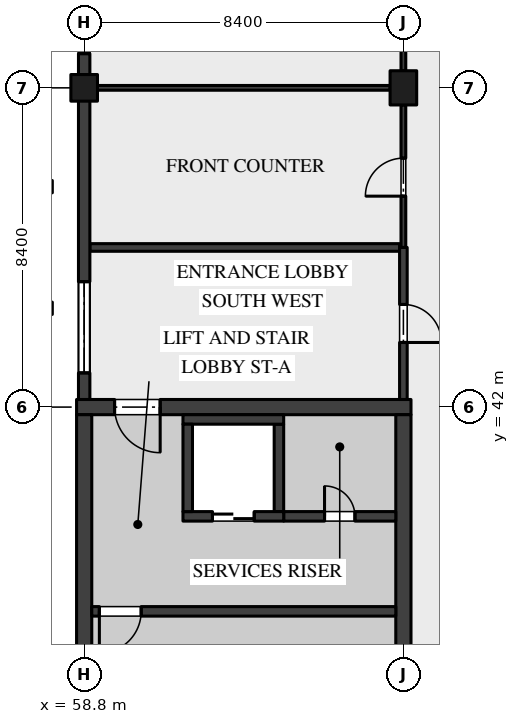
"""IFC4 building model, lengths in metres.
Left out: names, types, materials, properties, quantities, classifications, styles, units other than length and angle.
Written with IfcOpenShell. Run it as: python <this file> out.ifc"""

import sys

from ifc_helpers import new_model, si_unit, direction, frame, frame_2d, origin, origin_2d, place, context, subcontext, project, spatial, rectangle, hollow_circle, extrude, element, fill, save


model = new_model("IFC4")
c1 = context("Model", 3, precision=1e-05, world=origin(), true_north=direction((0.0, 1.0)))
c2 = subcontext(c1, "Body", "Model", "MODEL_VIEW")
j1 = project(units=[si_unit("LENGTHUNIT", "METRE"), si_unit("PLANEANGLEUNIT", "RADIAN")], contexts=[c1])
p1 = place(None, origin())
s1 = spatial("IfcSite", under=j1, at=p1, CompositionType="ELEMENT")
p2 = place(p1, origin())
s2 = spatial("IfcBuilding", under=s1, at=p2, CompositionType="ELEMENT")
p3 = place(p2, origin())
s3 = spatial("IfcBuildingStorey", under=s2, at=p3, CompositionType="ELEMENT", Elevation=0.0)
p4 = place(p3, frame((58.8, 50.4, 0.0), z_axis=(0.0, 0.0, 1.0), x_axis=(1.0, 0.0, 0.0)))
e1 = element("IfcColumn", 1, at=p4, inside=s3, PredefinedType="COLUMN", context=c2, shape_type="SweptSolid", body=[
    extrude(rectangle(XDim=0.7, YDim=0.7, at=origin_2d()), origin(), (0.0, 0.0, 1.0), 5.05),
])
p5 = place(p3, frame((67.2, 50.4, 0.0), z_axis=(0.0, 0.0, 1.0), x_axis=(1.0, 0.0, 0.0)))
e2 = element("IfcColumn", 2, at=p5, inside=s3, PredefinedType="COLUMN", context=c2, shape_type="SweptSolid", body=[
    extrude(rectangle(XDim=0.7, YDim=0.9, at=origin_2d()), origin(), (0.0, 0.0, 1.0), 5.05),
])
for number, where, z_axis, x_axis in (
    (3, (57.8, 44.6, 0.0), (0.0, 0.0, 1.0), (1.0, 0.0, 0.0)),
    (4, (57.8, 47.8, 0.0), (0.0, 0.0, 1.0), (1.0, 0.0, 0.0)),
):
    element("IfcColumn", number, at=place(p3, frame(where, z_axis=z_axis, x_axis=x_axis)), inside=s3, PredefinedType="COLUMN", context=c2, shape_type="SweptSolid", body=[
        extrude(hollow_circle(Radius=0.162, WallThickness=0.013, at=origin_2d()), origin(), (0.0, 0.0, 1.0), 4.162),
    ])
p6 = place(p3, frame((58.6, 42.0, 0.0), z_axis=(0.0, 0.0, 1.0), x_axis=(1.0, 0.0, 0.0)))
e5 = element("IfcWall", 5, at=p6, inside=s3, PredefinedType="SHEAR", context=c2, shape_type="SweptSolid", body=[
    extrude(rectangle(XDim=8.8, YDim=0.4, at=frame_2d((4.4, 0.0))), origin(), (0.0, 0.0, 1.0), 5.05),
])
p7 = place(p6, frame((1.0, 0.0, 0.0)))
e6 = element("IfcOpeningElement", 6, at=p7, cuts=e5, PredefinedType="OPENING", context=c2, shape_type="SweptSolid", body=[
    extrude(rectangle(XDim=1.2, YDim=2.1, at=frame_2d((0.6, 1.05))), frame((0.0, 0.21, 0.0), z_axis=(0.0, -1.0, 0.0), x_axis=(1.0, 0.0, 0.0)), (0.0, 0.0, 1.0), 0.42),
])
for number, where, z_axis, x_axis in (
    (7, (58.8, 33.8, 0.0), (0.0, 0.0, 1.0), (0.0, 1.0, 0.0)),
    (8, (67.2, 33.8, 0.0), (0.0, 0.0, 1.0), (0.0, 1.0, 0.0)),
):
    element("IfcWall", number, at=place(p3, frame(where, z_axis=z_axis, x_axis=x_axis)), inside=s3, PredefinedType="SHEAR", context=c2, shape_type="SweptSolid", body=[
        extrude(rectangle(XDim=8.0, YDim=0.4, at=frame_2d((4.0, 0.0))), origin(), (0.0, 0.0, 1.0), 5.05),
    ])
p8 = place(p3, frame((59.0, 36.625, 0.0), z_axis=(0.0, 0.0, 1.0), x_axis=(1.0, 0.0, 0.0)))
e9 = element("IfcWall", 9, at=p8, inside=s3, PredefinedType="SOLIDWALL", context=c2, shape_type="SweptSolid", body=[
    extrude(rectangle(XDim=8.0, YDim=0.25, at=frame_2d((4.0, 0.0))), origin(), (0.0, 0.0, 1.0), 5.05),
])
p9 = place(p8, frame((0.2, 0.0, 0.0)))
e10 = element("IfcOpeningElement", 10, at=p9, cuts=e9, PredefinedType="OPENING", context=c2, shape_type="SweptSolid", body=[
    extrude(rectangle(XDim=1.1, YDim=2.1, at=frame_2d((0.55, 1.05))), frame((0.0, 0.135, 0.0), z_axis=(0.0, -1.0, 0.0), x_axis=(1.0, 0.0, 0.0)), (0.0, 0.0, 1.0), 0.27),
])
p10 = place(p3, frame((64.05, 39.125, 0.0), z_axis=(0.0, 0.0, 1.0), x_axis=(1.0, 0.0, 0.0)))
e11 = element("IfcWall", 11, at=p10, inside=s3, PredefinedType="SOLIDWALL", context=c2, shape_type="SweptSolid", body=[
    extrude(rectangle(XDim=2.95, YDim=0.25, at=frame_2d((1.475, 0.0))), origin(), (0.0, 0.0, 1.0), 5.05),
])
p11 = place(p10, frame((1.075, 0.0, 0.0)))
e12 = element("IfcOpeningElement", 12, at=p11, cuts=e11, PredefinedType="OPENING", context=c2, shape_type="SweptSolid", body=[
    extrude(rectangle(XDim=0.8, YDim=2.1, at=frame_2d((0.4, 1.05))), frame((0.0, 0.135, 0.0), z_axis=(0.0, -1.0, 0.0), x_axis=(1.0, 0.0, 0.0)), (0.0, 0.0, 1.0), 0.27),
])
p12 = place(p3, frame((63.925, 39.25, 0.0), z_axis=(0.0, 0.0, 1.0), x_axis=(0.0, 1.0, 0.0)))
e13 = element("IfcWall", 13, at=p12, inside=s3, PredefinedType="SOLIDWALL", context=c2, shape_type="SweptSolid", body=[
    extrude(rectangle(XDim=2.3, YDim=0.25, at=frame_2d((1.15, 0.0))), origin(), (0.0, 0.0, 1.0), 5.05),
])
p13 = place(p3, frame((61.4, 41.675, 0.0), z_axis=(0.0, 0.0, 1.0), x_axis=(1.0, 0.0, 0.0)))
e14 = element("IfcWall", 14, at=p13, inside=s3, PredefinedType="SOLIDWALL", context=c2, shape_type="SweptSolid", body=[
    extrude(rectangle(XDim=2.65, YDim=0.25, at=frame_2d((1.325, 0.0))), origin(), (0.0, 0.0, 1.0), 5.05),
])
p14 = place(p3, frame((61.4, 39.125, 0.0), z_axis=(0.0, 0.0, 1.0), x_axis=(1.0, 0.0, 0.0)))
e15 = element("IfcWall", 15, at=p14, inside=s3, PredefinedType="SOLIDWALL", context=c2, shape_type="SweptSolid", body=[
    extrude(rectangle(XDim=2.65, YDim=0.25, at=frame_2d((1.325, 0.0))), origin(), (0.0, 0.0, 1.0), 5.05),
])
p15 = place(p14, frame((0.775, 0.0, 0.0)))
e16 = element("IfcOpeningElement", 16, at=p15, cuts=e15, PredefinedType="OPENING", context=c2, shape_type="SweptSolid", body=[
    extrude(rectangle(XDim=1.1, YDim=2.1, at=frame_2d((0.55, 1.05))), frame((0.0, 0.135, 0.0), z_axis=(0.0, -1.0, 0.0), x_axis=(1.0, 0.0, 0.0)), (0.0, 0.0, 1.0), 0.27),
])
p16 = place(p3, frame((61.525, 39.25, 0.0), z_axis=(0.0, 0.0, 1.0), x_axis=(0.0, 1.0, 0.0)))
e17 = element("IfcWall", 17, at=p16, inside=s3, PredefinedType="SOLIDWALL", context=c2, shape_type="SweptSolid", body=[
    extrude(rectangle(XDim=2.3, YDim=0.25, at=frame_2d((1.15, 0.0))), origin(), (0.0, 0.0, 1.0), 5.05),
])
p17 = place(p3, frame((67.2, 46.2, 0.0), z_axis=(0.0, 0.0, 1.0), x_axis=(0.0, 1.0, 0.0)))
e18 = element("IfcWall", 18, at=p17, inside=s3, PredefinedType="PARTITIONING", context=c2, shape_type="SweptSolid", body=[
    extrude(rectangle(XDim=3.75, YDim=0.125, at=frame_2d((1.875, 0.0))), origin(), (0.0, 0.0, 1.0), 18.77),
])
p18 = place(p17, frame((1.35, 0.0, 0.0)))
e19 = element("IfcOpeningElement", 19, at=p18, cuts=e18, PredefinedType="OPENING", context=c2, shape_type="SweptSolid", body=[
    extrude(rectangle(XDim=1.0, YDim=2.4, at=frame_2d((0.5, 1.2))), frame((0.0, 0.073, 0.0), z_axis=(0.0, -1.0, 0.0), x_axis=(1.0, 0.0, 0.0)), (0.0, 0.0, 1.0), 0.145),
])
p19 = place(p3, frame((59.15, 50.4, 0.0), z_axis=(0.0, 0.0, 1.0), x_axis=(1.0, 0.0, 0.0)))
e20 = element("IfcWall", 20, at=p19, inside=s3, PredefinedType="PARTITIONING", context=c2, shape_type="SweptSolid", body=[
    extrude(rectangle(XDim=7.7, YDim=0.125, at=frame_2d((3.85, 0.0))), origin(), (0.0, 0.0, 1.0), 5.05),
])
p20 = place(p3, frame((58.95, 46.2, 0.0), z_axis=(0.0, 0.0, 1.0), x_axis=(1.0, 0.0, 0.0)))
e21 = element("IfcWall", 21, at=p20, inside=s3, PredefinedType="PARTITIONING", context=c2, shape_type="SweptSolid", body=[
    extrude(rectangle(XDim=8.15, YDim=0.2, at=frame_2d((4.075, 0.0))), origin(), (0.0, 0.0, 1.0), 5.05),
])
p21 = place(p3, frame((67.2, 50.85, 0.0), z_axis=(0.0, 0.0, 1.0), x_axis=(0.0, 1.0, 0.0)))
e22 = element("IfcWall", 22, at=p21, inside=s3, PredefinedType="PARTITIONING", context=c2, shape_type="SweptSolid", body=[
    extrude(rectangle(XDim=3.75, YDim=0.125, at=frame_2d((1.875, 0.0))), origin(), (0.0, 0.0, 1.0), 18.77),
])
p22 = place(p21, frame((1.35, 0.0, 0.0)))
e23 = element("IfcOpeningElement", 23, at=p22, cuts=e22, PredefinedType="OPENING", context=c2, shape_type="SweptSolid", body=[
    extrude(rectangle(XDim=1.0, YDim=2.4, at=frame_2d((0.5, 1.2))), frame((0.0, 0.073, 0.0), z_axis=(0.0, -1.0, 0.0), x_axis=(1.0, 0.0, 0.0)), (0.0, 0.0, 1.0), 0.145),
])
p23 = place(p3, frame((67.2, 42.2, 0.0), z_axis=(0.0, 0.0, 1.0), x_axis=(0.0, 1.0, 0.0)))
e24 = element("IfcWall", 24, at=p23, inside=s3, PredefinedType="PARTITIONING", context=c2, shape_type="SweptSolid", body=[
    extrude(rectangle(XDim=4.0, YDim=0.2, at=frame_2d((2.0, 0.0))), origin(), (0.0, 0.0, 1.0), 18.77),
])
p24 = place(p23, frame((1.5, 0.0, 0.0)))
e25 = element("IfcOpeningElement", 25, at=p24, cuts=e24, PredefinedType="OPENING", context=c2, shape_type="SweptSolid", body=[
    extrude(rectangle(XDim=1.0, YDim=2.4, at=frame_2d((0.5, 1.2))), frame((0.0, 0.11, 0.0), z_axis=(0.0, -1.0, 0.0), x_axis=(1.0, 0.0, 0.0)), (0.0, 0.0, 1.0), 0.22),
])
p25 = place(p3, frame((58.8, 58.6, 0.0), z_axis=(0.0, 0.0, 1.0), x_axis=(0.0, -1.0, 0.0)))
e26 = element("IfcWall", 26, at=p25, inside=s3, PredefinedType="SOLIDWALL", context=c2, shape_type="SweptSolid", body=[
    extrude(rectangle(XDim=7.87, YDim=0.3, at=frame_2d((3.935, 0.0))), origin(), (0.0, 0.0, 1.0), 5.05),
])
p26 = place(p25, frame((0.4, 0.0, 2.85)))
e27 = element("IfcOpeningElement", 27, at=p26, cuts=e26, PredefinedType="OPENING", context=c2, shape_type="SweptSolid", body=[
    extrude(rectangle(XDim=3.0, YDim=1.2, at=frame_2d((1.5, 0.6))), frame((0.0, 0.16, 0.0), z_axis=(0.0, -1.0, 0.0), x_axis=(1.0, 0.0, 0.0)), (0.0, 0.0, 1.0), 0.32),
])
p27 = place(p25, frame((4.9, 0.0, 2.25)))
e28 = element("IfcOpeningElement", 28, at=p27, cuts=e26, PredefinedType="OPENING", context=c2, shape_type="SweptSolid", body=[
    extrude(rectangle(XDim=2.4, YDim=1.8, at=frame_2d((1.2, 0.9))), frame((0.0, 0.16, 0.0), z_axis=(0.0, -1.0, 0.0), x_axis=(1.0, 0.0, 0.0)), (0.0, 0.0, 1.0), 0.32),
])
p28 = place(p3, frame((58.8, 50.07, 0.0), z_axis=(0.0, 0.0, 1.0), x_axis=(0.0, -1.0, 0.0)))
e29 = element("IfcWall", 29, at=p28, inside=s3, PredefinedType="SOLIDWALL", context=c2, shape_type="SweptSolid", body=[
    extrude(rectangle(XDim=7.87, YDim=0.3, at=frame_2d((3.935, 0.0))), origin(), (0.0, 0.0, 1.0), 5.05),
])
p29 = place(p28, frame((4.77, 0.0, 2.25)))
e30 = element("IfcOpeningElement", 30, at=p29, cuts=e29, PredefinedType="OPENING", context=c2, shape_type="SweptSolid", body=[
    extrude(rectangle(XDim=2.4, YDim=1.8, at=frame_2d((1.2, 0.9))), frame((0.0, 0.16, 0.0), z_axis=(0.0, -1.0, 0.0), x_axis=(1.0, 0.0, 0.0)), (0.0, 0.0, 1.0), 0.32),
])
p30 = place(p7, frame((1.2, 0.0, 0.0), z_axis=(0.0, 0.0, 1.0), x_axis=(-1.0, 0.0, 0.0)))
e31 = element("IfcDoor", 31, at=p30, inside=s3, OperationType="SINGLE_SWING_RIGHT", PredefinedType="DOOR", context=c2, shape_type="SweptSolid", body=[
    extrude(rectangle(XDim=1.2, YDim=2.1, at=frame_2d((0.6, 1.05))), frame((0.0, 0.035, 0.0), z_axis=(0.0, -1.0, 0.0), x_axis=(1.0, 0.0, 0.0)), (0.0, 0.0, 1.0), 0.07),
])
fill(e6, e31)
p31 = place(p11, origin())
e32 = element("IfcDoor", 32, at=p31, inside=s3, OperationType="SINGLE_SWING_RIGHT", PredefinedType="DOOR", context=c2, shape_type="SweptSolid", body=[
    extrude(rectangle(XDim=0.8, YDim=2.1, at=frame_2d((0.4, 1.05))), frame((0.0, 0.035, 0.0), z_axis=(0.0, -1.0, 0.0), x_axis=(1.0, 0.0, 0.0)), (0.0, 0.0, 1.0), 0.07),
])
fill(e12, e32)
p32 = place(p9, frame((1.1, 0.0, 0.0), z_axis=(0.0, 0.0, 1.0), x_axis=(-1.0, 0.0, 0.0)))
e33 = element("IfcDoor", 33, at=p32, inside=s3, OperationType="SINGLE_SWING_LEFT", PredefinedType="DOOR", context=c2, shape_type="SweptSolid", body=[
    extrude(rectangle(XDim=1.1, YDim=2.1, at=frame_2d((0.55, 1.05))), frame((0.0, 0.035, 0.0), z_axis=(0.0, -1.0, 0.0), x_axis=(1.0, 0.0, 0.0)), (0.0, 0.0, 1.0), 0.07),
])
fill(e10, e33)
p33 = place(p15, origin())
e34 = element("IfcDoor", 34, at=p33, inside=s3, OperationType="DOUBLE_DOOR_SLIDING", PredefinedType="DOOR", context=c2, shape_type="SweptSolid", body=[
    extrude(rectangle(XDim=1.1, YDim=2.1, at=frame_2d((0.55, 1.05))), frame((0.0, 0.04, 0.0), z_axis=(0.0, -1.0, 0.0), x_axis=(1.0, 0.0, 0.0)), (0.0, 0.0, 1.0), 0.08),
])
fill(e16, e34)
p34 = place(p18, origin())
e35 = element("IfcDoor", 35, at=p34, inside=s3, OperationType="SINGLE_SWING_RIGHT", PredefinedType="DOOR", context=c2, shape_type="SweptSolid", body=[
    extrude(rectangle(XDim=1.0, YDim=2.4, at=frame_2d((0.5, 1.2))), frame((0.0, 0.02, 0.0), z_axis=(0.0, -1.0, 0.0), x_axis=(1.0, 0.0, 0.0)), (0.0, 0.0, 1.0), 0.04),
])
fill(e19, e35)
p35 = place(p24, frame((1.0, 0.0, 0.0), z_axis=(0.0, 0.0, 1.0), x_axis=(-1.0, 0.0, 0.0)))
e36 = element("IfcDoor", 36, at=p35, inside=s3, OperationType="SINGLE_SWING_LEFT", PredefinedType="DOOR", context=c2, shape_type="SweptSolid", body=[
    extrude(rectangle(XDim=1.0, YDim=2.4, at=frame_2d((0.5, 1.2))), frame((0.0, 0.03, 0.0), z_axis=(0.0, -1.0, 0.0), x_axis=(1.0, 0.0, 0.0)), (0.0, 0.0, 1.0), 0.06),
])
fill(e25, e36)
p36 = place(p27, origin())
e37 = element("IfcWindow", 37, at=p36, inside=s3, PartitioningType="SINGLE_PANEL", PredefinedType="WINDOW", context=c2, shape_type="SweptSolid", body=[
    extrude(rectangle(XDim=2.4, YDim=1.8, at=frame_2d((1.2, 0.9))), frame((0.0, 0.05, 0.0), z_axis=(0.0, -1.0, 0.0), x_axis=(1.0, 0.0, 0.0)), (0.0, 0.0, 1.0), 0.1),
])
fill(e28, e37)
p37 = place(p29, origin())
e38 = element("IfcWindow", 38, at=p37, inside=s3, PartitioningType="SINGLE_PANEL", PredefinedType="WINDOW", context=c2, shape_type="SweptSolid", body=[
    extrude(rectangle(XDim=2.4, YDim=1.8, at=frame_2d((1.2, 0.9))), frame((0.0, 0.05, 0.0), z_axis=(0.0, -1.0, 0.0), x_axis=(1.0, 0.0, 0.0)), (0.0, 0.0, 1.0), 0.1),
])
fill(e30, e38)
save(model, sys.argv[1])
